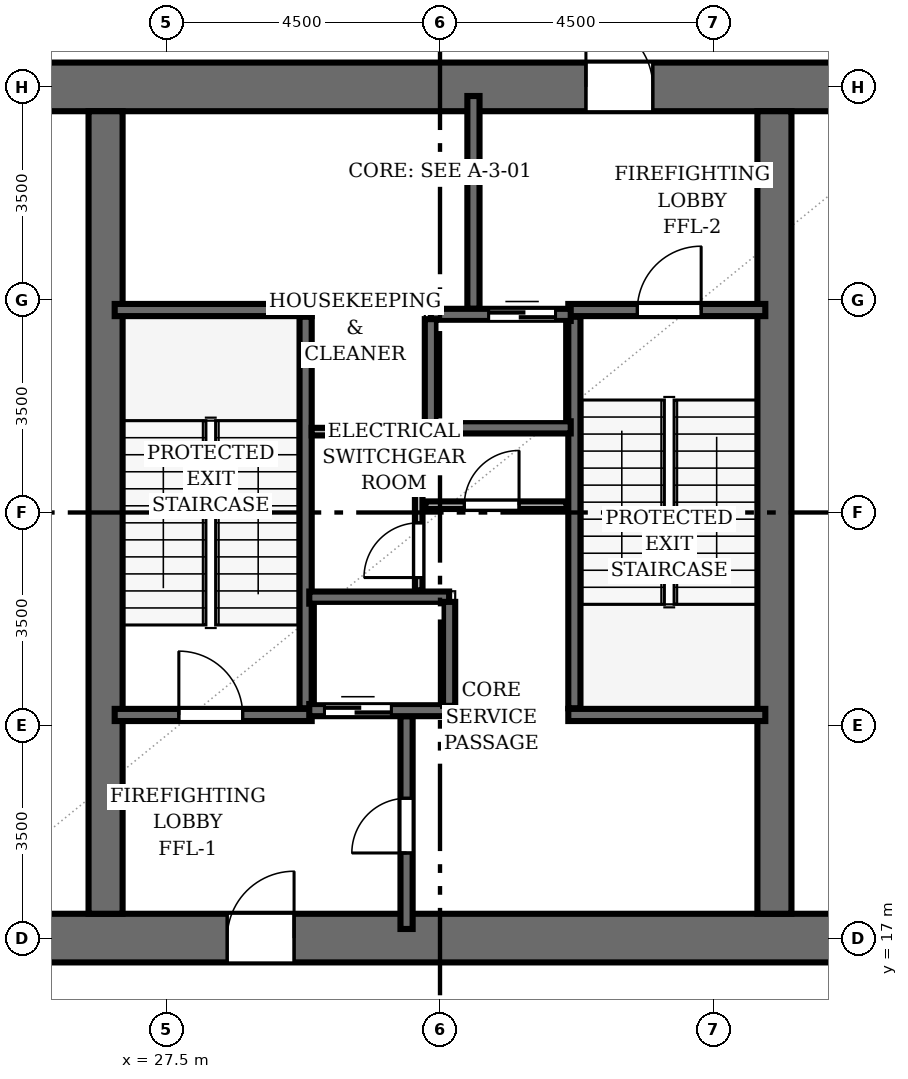
"""IFC4 building model, lengths in metres.
Left out: names, types, materials, properties, quantities, classifications, styles, units other than length and angle.
Written with IfcOpenShell. Run it as: python <this file> out.ifc"""

import sys

from ifc_helpers import new_model, si_unit, direction, frame, frame_2d, origin, place, context, subcontext, project, spatial, rectangle, extrude, element, fill, save


model = new_model("IFC4")
c1 = context("Model", 3, precision=1e-05, world=origin(), true_north=direction((0.0, 1.0)))
c2 = subcontext(c1, "Body", "Model", "MODEL_VIEW")
j1 = project(units=[si_unit("LENGTHUNIT", "METRE"), si_unit("PLANEANGLEUNIT", "RADIAN")], contexts=[c1])
p1 = place(None, origin())
s1 = spatial("IfcSite", under=j1, at=p1, CompositionType="ELEMENT")
p2 = place(p1, origin())
s2 = spatial("IfcBuilding", under=s1, at=p2, CompositionType="ELEMENT")
p3 = place(p2, frame((0.0, 0.0, -9.0)))
s3 = spatial("IfcBuildingStorey", under=s2, at=p3, CompositionType="ELEMENT", Elevation=-9.0)
p4 = place(p3, frame((22.6, 17.0, 0.0), z_axis=(0.0, 0.0, 1.0), x_axis=(1.0, 0.0, 0.0)))
e1 = element("IfcWall", 1, at=p4, inside=s3, PredefinedType="SHEAR", context=c2, shape_type="SweptSolid", body=[
    extrude(rectangle(XDim=18.8, YDim=0.8, at=frame_2d((9.4, 0.0))), origin(), (0.0, 0.0, 1.0), 4.5),
])
p5 = place(p4, frame((5.9, 0.0, 0.0)))
e2 = element("IfcOpeningElement", 2, at=p5, cuts=e1, PredefinedType="OPENING", context=c2, shape_type="SweptSolid", body=[
    extrude(rectangle(XDim=1.1, YDim=2.15, at=frame_2d((0.55, 1.075))), frame((0.0, 0.41, 0.0), z_axis=(0.0, -1.0, 0.0), x_axis=(1.0, 0.0, 0.0)), (0.0, 0.0, 1.0), 0.82),
])
p6 = place(p3, frame((22.6, 31.0, 0.0), z_axis=(0.0, 0.0, 1.0), x_axis=(1.0, 0.0, 0.0)))
e3 = element("IfcWall", 3, at=p6, inside=s3, PredefinedType="SHEAR", context=c2, shape_type="SweptSolid", body=[
    extrude(rectangle(XDim=18.8, YDim=0.8, at=frame_2d((9.4, 0.0))), origin(), (0.0, 0.0, 1.0), 4.5),
])
p7 = place(p6, frame((11.8, 0.0, 0.0)))
e4 = element("IfcOpeningElement", 4, at=p7, cuts=e3, PredefinedType="OPENING", context=c2, shape_type="SweptSolid", body=[
    extrude(rectangle(XDim=1.1, YDim=2.15, at=frame_2d((0.55, 1.075))), frame((0.0, 0.41, 0.0), z_axis=(0.0, -1.0, 0.0), x_axis=(1.0, 0.0, 0.0)), (0.0, 0.0, 1.0), 0.82),
])
for number, where, z_axis, x_axis in (
    (5, (26.5, 17.4, 0.0), (0.0, 0.0, 1.0), (0.0, 1.0, 0.0)),
    (6, (37.5, 17.4, 0.0), (0.0, 0.0, 1.0), (0.0, 1.0, 0.0)),
):
    element("IfcWall", number, at=place(p3, frame(where, z_axis=z_axis, x_axis=x_axis)), inside=s3, PredefinedType="SHEAR", context=c2, shape_type="SweptSolid", body=[
        extrude(rectangle(XDim=13.2, YDim=0.56, at=frame_2d((6.6, 0.0))), origin(), (0.0, 0.0, 1.0), 4.5),
    ])
p8 = place(p3, frame((29.79, 20.78, 0.0), z_axis=(0.0, 0.0, 1.0), x_axis=(0.0, 1.0, 0.0)))
e7 = element("IfcWall", 7, at=p8, inside=s3, PredefinedType="SHEAR", context=c2, shape_type="SweptSolid", body=[
    extrude(rectangle(XDim=6.44, YDim=0.2, at=frame_2d((3.22, 0.0))), origin(), (0.0, 0.0, 1.0), 4.5),
])
p9 = place(p3, frame((26.65, 27.33, 0.0), z_axis=(0.0, 0.0, 1.0), x_axis=(1.0, 0.0, 0.0)))
e8 = element("IfcWall", 8, at=p9, inside=s3, PredefinedType="SHEAR", context=c2, shape_type="SweptSolid", body=[
    extrude(rectangle(XDim=3.24, YDim=0.2, at=frame_2d((1.62, 0.0))), origin(), (0.0, 0.0, 1.0), 4.5),
])
p10 = place(p3, frame((26.65, 20.67, 0.0), z_axis=(0.0, 0.0, 1.0), x_axis=(1.0, 0.0, 0.0)))
e9 = element("IfcWall", 9, at=p10, inside=s3, PredefinedType="SHEAR", context=c2, shape_type="SweptSolid", body=[
    extrude(rectangle(XDim=3.24, YDim=0.2, at=frame_2d((1.62, 0.0))), origin(), (0.0, 0.0, 1.0), 4.5),
])
p11 = place(p10, frame((1.055, 0.0, 0.0)))
e10 = element("IfcOpeningElement", 10, at=p11, cuts=e9, PredefinedType="OPENING", context=c2, shape_type="SweptSolid", body=[
    extrude(rectangle(XDim=1.05, YDim=2.15, at=frame_2d((0.525, 1.075))), frame((0.0, 0.11, 0.0), z_axis=(0.0, -1.0, 0.0), x_axis=(1.0, 0.0, 0.0)), (0.0, 0.0, 1.0), 0.22),
])
p12 = place(p3, frame((34.21, 20.78, 0.0), z_axis=(0.0, 0.0, 1.0), x_axis=(0.0, 1.0, 0.0)))
e11 = element("IfcWall", 11, at=p12, inside=s3, PredefinedType="SHEAR", context=c2, shape_type="SweptSolid", body=[
    extrude(rectangle(XDim=6.44, YDim=0.2, at=frame_2d((3.22, 0.0))), origin(), (0.0, 0.0, 1.0), 4.5),
])
p13 = place(p3, frame((34.11, 20.67, 0.0), z_axis=(0.0, 0.0, 1.0), x_axis=(1.0, 0.0, 0.0)))
e12 = element("IfcWall", 12, at=p13, inside=s3, PredefinedType="SHEAR", context=c2, shape_type="SweptSolid", body=[
    extrude(rectangle(XDim=3.24, YDim=0.2, at=frame_2d((1.62, 0.0))), origin(), (0.0, 0.0, 1.0), 4.5),
])
p14 = place(p3, frame((34.11, 27.33, 0.0), z_axis=(0.0, 0.0, 1.0), x_axis=(1.0, 0.0, 0.0)))
e13 = element("IfcWall", 13, at=p14, inside=s3, PredefinedType="SHEAR", context=c2, shape_type="SweptSolid", body=[
    extrude(rectangle(XDim=3.24, YDim=0.2, at=frame_2d((1.62, 0.0))), origin(), (0.0, 0.0, 1.0), 4.5),
])
p15 = place(p14, frame((1.135, 0.0, 0.0)))
e14 = element("IfcOpeningElement", 14, at=p15, cuts=e13, PredefinedType="OPENING", context=c2, shape_type="SweptSolid", body=[
    extrude(rectangle(XDim=1.05, YDim=2.15, at=frame_2d((0.525, 1.075))), frame((0.0, 0.11, 0.0), z_axis=(0.0, -1.0, 0.0), x_axis=(1.0, 0.0, 0.0)), (0.0, 0.0, 1.0), 0.22),
])
p16 = place(p3, frame((31.45, 17.15, 0.0), z_axis=(0.0, 0.0, 1.0), x_axis=(0.0, 1.0, 0.0)))
e15 = element("IfcWall", 15, at=p16, inside=s3, PredefinedType="SHEAR", context=c2, shape_type="SweptSolid", body=[
    extrude(rectangle(XDim=3.5, YDim=0.2, at=frame_2d((1.75, 0.0))), origin(), (0.0, 0.0, 1.0), 4.5),
])
p17 = place(p16, frame((1.25, 0.0, 0.0)))
e16 = element("IfcOpeningElement", 16, at=p17, cuts=e15, PredefinedType="OPENING", context=c2, shape_type="SweptSolid", body=[
    extrude(rectangle(XDim=0.9, YDim=2.1, at=frame_2d((0.45, 1.05))), frame((0.0, 0.11, 0.0), z_axis=(0.0, -1.0, 0.0), x_axis=(1.0, 0.0, 0.0)), (0.0, 0.0, 1.0), 0.22),
])
p18 = place(p3, frame((32.55, 27.35, 0.0), z_axis=(0.0, 0.0, 1.0), x_axis=(0.0, 1.0, 0.0)))
e17 = element("IfcWall", 17, at=p18, inside=s3, PredefinedType="SHEAR", context=c2, shape_type="SweptSolid", body=[
    extrude(rectangle(XDim=3.5, YDim=0.2, at=frame_2d((1.75, 0.0))), origin(), (0.0, 0.0, 1.0), 4.5),
])
p19 = place(p3, frame((29.85, 20.75, 0.0), z_axis=(0.0, 0.0, 1.0), x_axis=(1.0, 0.0, 0.0)))
e18 = element("IfcWall", 18, at=p19, inside=s3, PredefinedType="SHEAR", context=c2, shape_type="SweptSolid", body=[
    extrude(rectangle(XDim=2.3, YDim=0.2, at=frame_2d((1.15, 0.0))), origin(), (0.0, 0.0, 1.0), 4.5),
])
p20 = place(p19, frame((0.25, 0.0, 0.0)))
e19 = element("IfcOpeningElement", 19, at=p20, cuts=e18, PredefinedType="OPENING", context=c2, shape_type="SweptSolid", body=[
    extrude(rectangle(XDim=1.1, YDim=2.15, at=frame_2d((0.55, 1.075))), frame((0.0, 0.11, 0.0), z_axis=(0.0, -1.0, 0.0), x_axis=(1.0, 0.0, 0.0)), (0.0, 0.0, 1.0), 0.22),
])
p21 = place(p3, frame((29.85, 22.6, 0.0), z_axis=(0.0, 0.0, 1.0), x_axis=(1.0, 0.0, 0.0)))
e20 = element("IfcWall", 20, at=p21, inside=s3, PredefinedType="SHEAR", context=c2, shape_type="SweptSolid", body=[
    extrude(rectangle(XDim=2.3, YDim=0.2, at=frame_2d((1.15, 0.0))), origin(), (0.0, 0.0, 1.0), 4.5),
])
p22 = place(p3, frame((32.15, 20.82, 0.0), z_axis=(0.0, 0.0, 1.0), x_axis=(0.0, 1.0, 0.0)))
e21 = element("IfcWall", 21, at=p22, inside=s3, PredefinedType="SHEAR", context=c2, shape_type="SweptSolid", body=[
    extrude(rectangle(XDim=1.71, YDim=0.2, at=frame_2d((0.855, 0.0))), origin(), (0.0, 0.0, 1.0), 4.5),
])
p23 = place(p3, frame((31.85, 27.25, 0.0), z_axis=(0.0, 0.0, 1.0), x_axis=(1.0, 0.0, 0.0)))
e22 = element("IfcWall", 22, at=p23, inside=s3, PredefinedType="SHEAR", context=c2, shape_type="SweptSolid", body=[
    extrude(rectangle(XDim=2.3, YDim=0.2, at=frame_2d((1.15, 0.0))), origin(), (0.0, 0.0, 1.0), 4.5),
])
p24 = place(p23, frame((0.95, 0.0, 0.0)))
e23 = element("IfcOpeningElement", 23, at=p24, cuts=e22, PredefinedType="OPENING", context=c2, shape_type="SweptSolid", body=[
    extrude(rectangle(XDim=1.1, YDim=2.15, at=frame_2d((0.55, 1.075))), frame((0.0, 0.11, 0.0), z_axis=(0.0, -1.0, 0.0), x_axis=(1.0, 0.0, 0.0)), (0.0, 0.0, 1.0), 0.22),
])
p25 = place(p3, frame((31.85, 25.4, 0.0), z_axis=(0.0, 0.0, 1.0), x_axis=(1.0, 0.0, 0.0)))
e24 = element("IfcWall", 24, at=p25, inside=s3, PredefinedType="SHEAR", context=c2, shape_type="SweptSolid", body=[
    extrude(rectangle(XDim=2.3, YDim=0.2, at=frame_2d((1.15, 0.0))), origin(), (0.0, 0.0, 1.0), 4.5),
])
p26 = place(p3, frame((31.85, 25.47, 0.0), z_axis=(0.0, 0.0, 1.0), x_axis=(0.0, 1.0, 0.0)))
e25 = element("IfcWall", 25, at=p26, inside=s3, PredefinedType="SHEAR", context=c2, shape_type="SweptSolid", body=[
    extrude(rectangle(XDim=1.71, YDim=0.2, at=frame_2d((0.855, 0.0))), origin(), (0.0, 0.0, 1.0), 4.5),
])
p27 = place(p3, frame((31.65, 22.72, 0.0), z_axis=(0.0, 0.0, 1.0), x_axis=(0.0, 1.0, 0.0)))
e26 = element("IfcWall", 26, at=p27, inside=s3, PredefinedType="PARTITIONING", context=c2, shape_type="SweptSolid", body=[
    extrude(rectangle(XDim=2.52, YDim=0.125, at=frame_2d((1.26, 0.0))), origin(), (0.0, 0.0, 1.0), 4.195),
])
p28 = place(p27, frame((0.21, 0.0, 0.0)))
e27 = element("IfcOpeningElement", 27, at=p28, cuts=e26, PredefinedType="OPENING", context=c2, shape_type="SweptSolid", body=[
    extrude(rectangle(XDim=0.9, YDim=2.1, at=frame_2d((0.45, 1.05))), frame((0.0, 0.073, 0.0), z_axis=(0.0, -1.0, 0.0), x_axis=(1.0, 0.0, 0.0)), (0.0, 0.0, 1.0), 0.145),
])
p29 = place(p3, frame((31.76, 24.12, 0.0), z_axis=(0.0, 0.0, 1.0), x_axis=(1.0, 0.0, 0.0)))
e28 = element("IfcWall", 28, at=p29, inside=s3, PredefinedType="PARTITIONING", context=c2, shape_type="SweptSolid", body=[
    extrude(rectangle(XDim=2.32, YDim=0.125, at=frame_2d((1.16, 0.0))), origin(), (0.0, 0.0, 1.0), 4.195),
])
p30 = place(p29, frame((0.64, 0.0, 0.0)))
e29 = element("IfcOpeningElement", 29, at=p30, cuts=e28, PredefinedType="OPENING", context=c2, shape_type="SweptSolid", body=[
    extrude(rectangle(XDim=0.9, YDim=2.1, at=frame_2d((0.45, 1.05))), frame((0.0, 0.073, 0.0), z_axis=(0.0, -1.0, 0.0), x_axis=(1.0, 0.0, 0.0)), (0.0, 0.0, 1.0), 0.145),
])
p31 = place(p3, frame((29.89, 25.33, 0.0), z_axis=(0.0, 0.0, 1.0), x_axis=(1.0, 0.0, 0.0)))
e30 = element("IfcWall", 30, at=p31, inside=s3, PredefinedType="PARTITIONING", context=c2, shape_type="SweptSolid", body=[
    extrude(rectangle(XDim=1.94, YDim=0.125, at=frame_2d((0.97, 0.0))), origin(), (0.0, 0.0, 1.0), 4.195),
])
p32 = place(p11, origin())
e31 = element("IfcDoor", 31, at=p32, inside=s3, OperationType="SINGLE_SWING_LEFT", PredefinedType="DOOR", context=c2, shape_type="SweptSolid", body=[
    extrude(rectangle(XDim=1.05, YDim=2.15, at=frame_2d((0.525, 1.075))), frame((0.0, 0.025, 0.0), z_axis=(0.0, -1.0, 0.0), x_axis=(1.0, 0.0, 0.0)), (0.0, 0.0, 1.0), 0.05),
])
fill(e10, e31)
p33 = place(p15, origin())
e32 = element("IfcDoor", 32, at=p33, inside=s3, OperationType="SINGLE_SWING_RIGHT", PredefinedType="DOOR", context=c2, shape_type="SweptSolid", body=[
    extrude(rectangle(XDim=1.05, YDim=2.15, at=frame_2d((0.525, 1.075))), frame((0.0, 0.025, 0.0), z_axis=(0.0, -1.0, 0.0), x_axis=(1.0, 0.0, 0.0)), (0.0, 0.0, 1.0), 0.05),
])
fill(e14, e32)
p34 = place(p5, origin())
e33 = element("IfcDoor", 33, at=p34, inside=s3, OperationType="SINGLE_SWING_RIGHT", PredefinedType="DOOR", context=c2, shape_type="SweptSolid", body=[
    extrude(rectangle(XDim=1.1, YDim=2.15, at=frame_2d((0.55, 1.075))), frame((0.0, 0.025, 0.0), z_axis=(0.0, -1.0, 0.0), x_axis=(1.0, 0.0, 0.0)), (0.0, 0.0, 1.0), 0.05),
])
fill(e2, e33)
p35 = place(p7, origin())
e34 = element("IfcDoor", 34, at=p35, inside=s3, OperationType="SINGLE_SWING_LEFT", PredefinedType="DOOR", context=c2, shape_type="SweptSolid", body=[
    extrude(rectangle(XDim=1.1, YDim=2.15, at=frame_2d((0.55, 1.075))), frame((0.0, 0.025, 0.0), z_axis=(0.0, -1.0, 0.0), x_axis=(1.0, 0.0, 0.0)), (0.0, 0.0, 1.0), 0.05),
])
fill(e4, e34)
p36 = place(p20, origin())
e35 = element("IfcDoor", 35, at=p36, inside=s3, OperationType="DOUBLE_DOOR_SLIDING", PredefinedType="DOOR", context=c2, shape_type="SweptSolid", body=[
    extrude(rectangle(XDim=1.1, YDim=2.15, at=frame_2d((0.55, 1.075))), frame((0.0, 0.025, 0.0), z_axis=(0.0, -1.0, 0.0), x_axis=(1.0, 0.0, 0.0)), (0.0, 0.0, 1.0), 0.05),
])
fill(e19, e35)
p37 = place(p24, origin())
e36 = element("IfcDoor", 36, at=p37, inside=s3, OperationType="DOUBLE_DOOR_SLIDING", PredefinedType="DOOR", context=c2, shape_type="SweptSolid", body=[
    extrude(rectangle(XDim=1.1, YDim=2.15, at=frame_2d((0.55, 1.075))), frame((0.0, 0.025, 0.0), z_axis=(0.0, -1.0, 0.0), x_axis=(1.0, 0.0, 0.0)), (0.0, 0.0, 1.0), 0.05),
])
fill(e23, e36)
p38 = place(p17, origin())
e37 = element("IfcDoor", 37, at=p38, inside=s3, OperationType="SINGLE_SWING_LEFT", PredefinedType="DOOR", context=c2, shape_type="SweptSolid", body=[
    extrude(rectangle(XDim=0.9, YDim=2.1, at=frame_2d((0.45, 1.05))), frame((0.0, 0.025, 0.0), z_axis=(0.0, -1.0, 0.0), x_axis=(1.0, 0.0, 0.0)), (0.0, 0.0, 1.0), 0.05),
])
fill(e16, e37)
p39 = place(p28, origin())
e38 = element("IfcDoor", 38, at=p39, inside=s3, OperationType="SINGLE_SWING_LEFT", PredefinedType="DOOR", context=c2, shape_type="SweptSolid", body=[
    extrude(rectangle(XDim=0.9, YDim=2.1, at=frame_2d((0.45, 1.05))), frame((0.0, 0.025, 0.0), z_axis=(0.0, -1.0, 0.0), x_axis=(1.0, 0.0, 0.0)), (0.0, 0.0, 1.0), 0.05),
])
fill(e27, e38)
p40 = place(p30, origin())
e39 = element("IfcDoor", 39, at=p40, inside=s3, OperationType="SINGLE_SWING_RIGHT", PredefinedType="DOOR", context=c2, shape_type="SweptSolid", body=[
    extrude(rectangle(XDim=0.9, YDim=2.1, at=frame_2d((0.45, 1.05))), frame((0.0, 0.025, 0.0), z_axis=(0.0, -1.0, 0.0), x_axis=(1.0, 0.0, 0.0)), (0.0, 0.0, 1.0), 0.05),
])
fill(e29, e39)
save(model, sys.argv[1])
